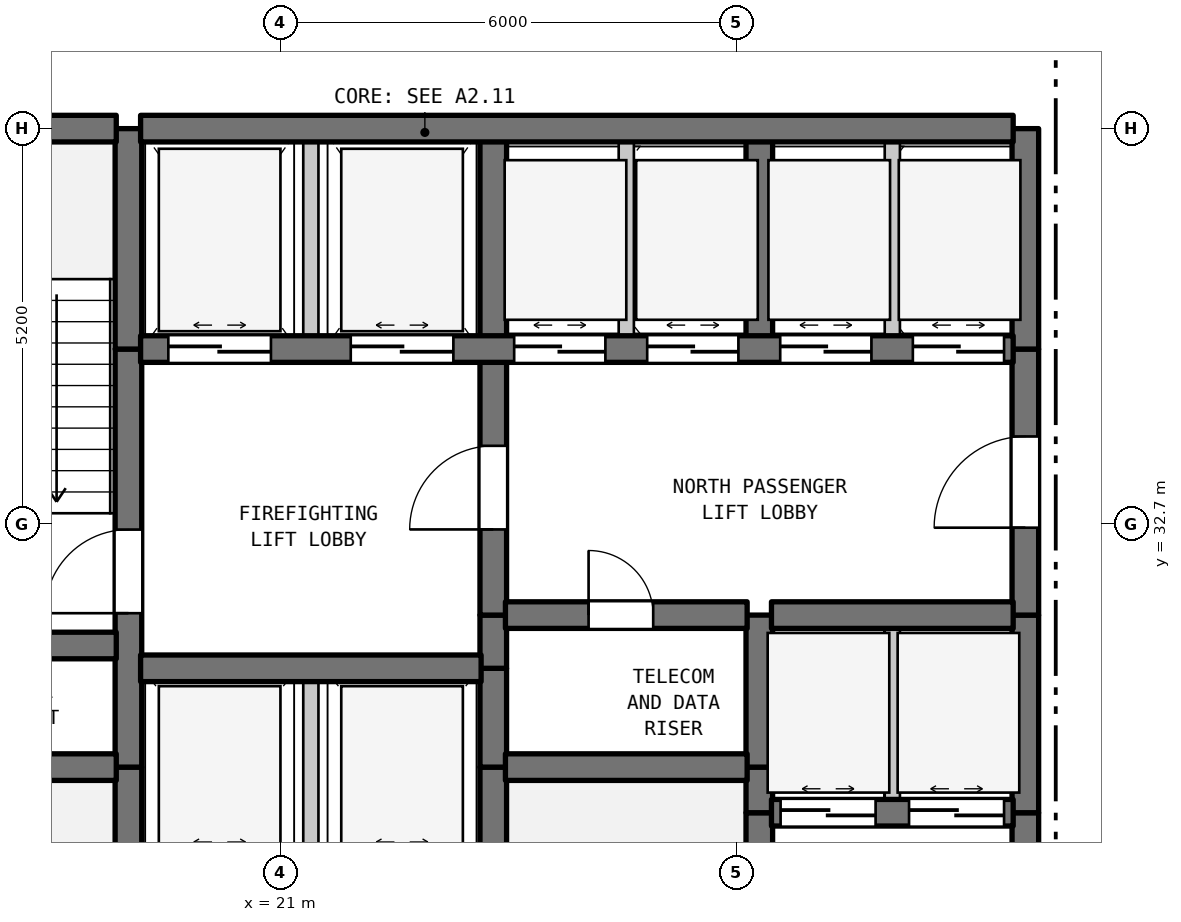
"""IFC4 building model, lengths in metres.
Left out: names, types, materials, properties, quantities, classifications, styles, units other than length and angle.
Written with IfcOpenShell. Run it as: python <this file> out.ifc"""

import sys

from ifc_helpers import new_model, si_unit, direction, frame, frame_2d, origin, place, context, subcontext, project, spatial, rectangle, extrude, element, fill, save


model = new_model("IFC4")
c1 = context("Model", 3, precision=1e-05, world=origin(), true_north=direction((0.0, 1.0)))
c2 = subcontext(c1, "Body", "Model", "MODEL_VIEW")
j1 = project(units=[si_unit("LENGTHUNIT", "METRE"), si_unit("PLANEANGLEUNIT", "RADIAN")], contexts=[c1])
p1 = place(None, origin())
s1 = spatial("IfcSite", under=j1, at=p1, CompositionType="ELEMENT")
p2 = place(p1, origin())
s2 = spatial("IfcBuilding", under=s1, at=p2, CompositionType="ELEMENT")
p3 = place(p2, frame((0.0, 0.0, 86.4)))
s3 = spatial("IfcBuildingStorey", under=s2, at=p3, CompositionType="ELEMENT", Elevation=86.4)
p4 = place(p3, frame((19.0, 28.2, 0.0), z_axis=(0.0, 0.0, 1.0), x_axis=(0.0, 1.0, 0.0)))
e1 = element("IfcWall", 1, at=p4, inside=s3, PredefinedType="SHEAR", context=c2, shape_type="SweptSolid", body=[
    extrude(rectangle(XDim=1.3, YDim=0.35, at=frame_2d((0.65, 0.0))), origin(), (0.0, 0.0, 1.0), 4.185),
])
p5 = place(p3, frame((19.0, 29.5, 0.0), z_axis=(0.0, 0.0, 1.0), x_axis=(0.0, 1.0, 0.0)))
e2 = element("IfcWall", 2, at=p5, inside=s3, PredefinedType="SHEAR", context=c2, shape_type="SweptSolid", body=[
    extrude(rectangle(XDim=5.5, YDim=0.35, at=frame_2d((2.75, 0.0))), origin(), (0.0, 0.0, 1.0), 4.185),
])
p6 = place(p5, frame((2.025, 0.0, 0.0)))
e3 = element("IfcOpeningElement", 3, at=p6, cuts=e2, PredefinedType="OPENING", context=c2, shape_type="SweptSolid", body=[
    extrude(rectangle(XDim=1.1, YDim=2.15, at=frame_2d((0.55, 1.075))), frame((0.0, 0.185, 0.0), z_axis=(0.0, -1.0, 0.0), x_axis=(1.0, 0.0, 0.0)), (0.0, 0.0, 1.0), 0.37),
])
p7 = place(p3, frame((19.0, 35.0, 0.0), z_axis=(0.0, 0.0, 1.0), x_axis=(0.0, 1.0, 0.0)))
e4 = element("IfcWall", 4, at=p7, inside=s3, PredefinedType="SHEAR", context=c2, shape_type="SweptSolid", body=[
    extrude(rectangle(XDim=2.9, YDim=0.35, at=frame_2d((1.45, 0.0))), origin(), (0.0, 0.0, 1.0), 4.185),
])
p8 = place(p3, frame((21.4, 28.2, 0.0), z_axis=(0.0, 0.0, 1.0), x_axis=(0.0, 1.0, 0.0)))
e5 = element("IfcWall", 5, at=p8, inside=s3, PredefinedType="STANDARD", context=c2, shape_type="SweptSolid", body=[
    extrude(rectangle(XDim=2.6, YDim=0.2, at=frame_2d((1.3, 0.0))), origin(), (0.0, 0.0, 1.0), 4.185),
])
p9 = place(p3, frame((21.4, 35.0, 0.0), z_axis=(0.0, 0.0, 1.0), x_axis=(0.0, 1.0, 0.0)))
e6 = element("IfcWall", 6, at=p9, inside=s3, PredefinedType="STANDARD", context=c2, shape_type="SweptSolid", body=[
    extrude(rectangle(XDim=2.9, YDim=0.2, at=frame_2d((1.45, 0.0))), origin(), (0.0, 0.0, 1.0), 4.185),
])
for number, where, z_axis, x_axis in (
    (7, (23.8, 28.2, 0.0), (0.0, 0.0, 1.0), (0.0, 1.0, 0.0)),
    (8, (23.8, 29.5, 0.0), (0.0, 0.0, 1.0), (0.0, 1.0, 0.0)),
):
    element("IfcWall", number, at=place(p3, frame(where, z_axis=z_axis, x_axis=x_axis)), inside=s3, PredefinedType="SHEAR", context=c2, shape_type="SweptSolid", body=[
        extrude(rectangle(XDim=1.3, YDim=0.35, at=frame_2d((0.65, 0.0))), origin(), (0.0, 0.0, 1.0), 4.185),
    ])
p10 = place(p3, frame((23.8, 30.8, 0.0), z_axis=(0.0, 0.0, 1.0), x_axis=(0.0, 1.0, 0.0)))
e9 = element("IfcWall", 9, at=p10, inside=s3, PredefinedType="SHEAR", context=c2, shape_type="SweptSolid", body=[
    extrude(rectangle(XDim=0.7, YDim=0.35, at=frame_2d((0.35, 0.0))), origin(), (0.0, 0.0, 1.0), 4.185),
])
p11 = place(p3, frame((23.8, 31.5, 0.0), z_axis=(0.0, 0.0, 1.0), x_axis=(0.0, 1.0, 0.0)))
e10 = element("IfcWall", 10, at=p11, inside=s3, PredefinedType="SHEAR", context=c2, shape_type="SweptSolid", body=[
    extrude(rectangle(XDim=3.5, YDim=0.35, at=frame_2d((1.75, 0.0))), origin(), (0.0, 0.0, 1.0), 4.185),
])
p12 = place(p11, frame((1.127, 0.0, 0.0)))
e11 = element("IfcOpeningElement", 11, at=p12, cuts=e10, PredefinedType="OPENING", context=c2, shape_type="SweptSolid", body=[
    extrude(rectangle(XDim=1.1, YDim=2.15, at=frame_2d((0.55, 1.075))), frame((0.0, 0.185, 0.0), z_axis=(0.0, -1.0, 0.0), x_axis=(1.0, 0.0, 0.0)), (0.0, 0.0, 1.0), 0.37),
])
p13 = place(p3, frame((23.8, 35.0, 0.0), z_axis=(0.0, 0.0, 1.0), x_axis=(0.0, 1.0, 0.0)))
e12 = element("IfcWall", 12, at=p13, inside=s3, PredefinedType="SHEAR", context=c2, shape_type="SweptSolid", body=[
    extrude(rectangle(XDim=2.9, YDim=0.35, at=frame_2d((1.45, 0.0))), origin(), (0.0, 0.0, 1.0), 4.185),
])
p14 = place(p3, frame((25.55, 35.0, 0.0), z_axis=(0.0, 0.0, 1.0), x_axis=(0.0, 1.0, 0.0)))
e13 = element("IfcWall", 13, at=p14, inside=s3, PredefinedType="STANDARD", context=c2, shape_type="SweptSolid", body=[
    extrude(rectangle(XDim=2.9, YDim=0.2, at=frame_2d((1.45, 0.0))), origin(), (0.0, 0.0, 1.0), 4.185),
])
p15 = place(p3, frame((27.3, 25.6, 0.0), z_axis=(0.0, 0.0, 1.0), x_axis=(0.0, 1.0, 0.0)))
e14 = element("IfcWall", 14, at=p15, inside=s3, PredefinedType="SHEAR", context=c2, shape_type="SweptSolid", body=[
    extrude(rectangle(XDim=3.3, YDim=0.35, at=frame_2d((1.65, 0.0))), origin(), (0.0, 0.0, 1.0), 4.185),
])
p16 = place(p3, frame((27.3, 28.9, 0.0), z_axis=(0.0, 0.0, 1.0), x_axis=(0.0, 1.0, 0.0)))
e15 = element("IfcWall", 15, at=p16, inside=s3, PredefinedType="SHEAR", context=c2, shape_type="SweptSolid", body=[
    extrude(rectangle(XDim=0.6, YDim=0.35, at=frame_2d((0.3, 0.0))), origin(), (0.0, 0.0, 1.0), 4.185),
])
p17 = place(p3, frame((27.3, 29.5, 0.0), z_axis=(0.0, 0.0, 1.0), x_axis=(0.0, 1.0, 0.0)))
e16 = element("IfcWall", 16, at=p17, inside=s3, PredefinedType="SHEAR", context=c2, shape_type="SweptSolid", body=[
    extrude(rectangle(XDim=2.0, YDim=0.35, at=frame_2d((1.0, 0.0))), origin(), (0.0, 0.0, 1.0), 4.185),
])
p18 = place(p3, frame((27.3, 35.0, 0.0), z_axis=(0.0, 0.0, 1.0), x_axis=(0.0, 1.0, 0.0)))
e17 = element("IfcWall", 17, at=p18, inside=s3, PredefinedType="SHEAR", context=c2, shape_type="SweptSolid", body=[
    extrude(rectangle(XDim=2.9, YDim=0.35, at=frame_2d((1.45, 0.0))), origin(), (0.0, 0.0, 1.0), 4.185),
])
p19 = place(p3, frame((29.05, 28.9, 0.0), z_axis=(0.0, 0.0, 1.0), x_axis=(0.0, 1.0, 0.0)))
e18 = element("IfcWall", 18, at=p19, inside=s3, PredefinedType="STANDARD", context=c2, shape_type="SweptSolid", body=[
    extrude(rectangle(XDim=2.6, YDim=0.2, at=frame_2d((1.3, 0.0))), origin(), (0.0, 0.0, 1.0), 4.185),
])
p20 = place(p3, frame((29.05, 35.0, 0.0), z_axis=(0.0, 0.0, 1.0), x_axis=(0.0, 1.0, 0.0)))
e19 = element("IfcWall", 19, at=p20, inside=s3, PredefinedType="STANDARD", context=c2, shape_type="SweptSolid", body=[
    extrude(rectangle(XDim=2.9, YDim=0.2, at=frame_2d((1.45, 0.0))), origin(), (0.0, 0.0, 1.0), 4.185),
])
p21 = place(p3, frame((30.8, 25.6, 0.0), z_axis=(0.0, 0.0, 1.0), x_axis=(0.0, 1.0, 0.0)))
e20 = element("IfcWall", 20, at=p21, inside=s3, PredefinedType="SHEAR", context=c2, shape_type="SweptSolid", body=[
    extrude(rectangle(XDim=3.3, YDim=0.35, at=frame_2d((1.65, 0.0))), origin(), (0.0, 0.0, 1.0), 4.185),
])
p22 = place(p21, frame((0.978, 0.0, 0.0)))
e21 = element("IfcOpeningElement", 21, at=p22, cuts=e20, PredefinedType="OPENING", context=c2, shape_type="SweptSolid", body=[
    extrude(rectangle(XDim=1.2, YDim=2.2, at=frame_2d((0.6, 1.1))), frame((0.0, 0.185, 0.0), z_axis=(0.0, -1.0, 0.0), x_axis=(1.0, 0.0, 0.0)), (0.0, 0.0, 1.0), 0.37),
])
p23 = place(p3, frame((30.8, 28.9, 0.0), z_axis=(0.0, 0.0, 1.0), x_axis=(0.0, 1.0, 0.0)))
e22 = element("IfcWall", 22, at=p23, inside=s3, PredefinedType="SHEAR", context=c2, shape_type="SweptSolid", body=[
    extrude(rectangle(XDim=2.6, YDim=0.35, at=frame_2d((1.3, 0.0))), origin(), (0.0, 0.0, 1.0), 4.185),
])
p24 = place(p3, frame((30.8, 31.5, 0.0), z_axis=(0.0, 0.0, 1.0), x_axis=(0.0, 1.0, 0.0)))
e23 = element("IfcWall", 23, at=p24, inside=s3, PredefinedType="SHEAR", context=c2, shape_type="SweptSolid", body=[
    extrude(rectangle(XDim=3.5, YDim=0.35, at=frame_2d((1.75, 0.0))), origin(), (0.0, 0.0, 1.0), 4.185),
])
p25 = place(p24, frame((1.15, 0.0, 0.0)))
e24 = element("IfcOpeningElement", 24, at=p25, cuts=e23, PredefinedType="OPENING", context=c2, shape_type="SweptSolid", body=[
    extrude(rectangle(XDim=1.2, YDim=2.2, at=frame_2d((0.6, 1.1))), frame((0.0, 0.185, 0.0), z_axis=(0.0, -1.0, 0.0), x_axis=(1.0, 0.0, 0.0)), (0.0, 0.0, 1.0), 0.37),
])
p26 = place(p3, frame((30.8, 35.0, 0.0), z_axis=(0.0, 0.0, 1.0), x_axis=(0.0, 1.0, 0.0)))
e25 = element("IfcWall", 25, at=p26, inside=s3, PredefinedType="SHEAR", context=c2, shape_type="SweptSolid", body=[
    extrude(rectangle(XDim=2.9, YDim=0.35, at=frame_2d((1.45, 0.0))), origin(), (0.0, 0.0, 1.0), 4.185),
])
p27 = place(p3, frame((27.46, 28.9, 0.0), z_axis=(0.0, 0.0, 1.0), x_axis=(1.0, 0.0, 0.0)))
e26 = element("IfcWall", 26, at=p27, inside=s3, PredefinedType="SHEAR", context=c2, shape_type="SweptSolid", body=[
    extrude(rectangle(XDim=3.18, YDim=0.35, at=frame_2d((1.59, 0.0))), origin(), (0.0, 0.0, 1.0), 4.185),
])
p28 = place(p27, frame((0.12, 0.0, 0.0)))
e27 = element("IfcOpeningElement", 27, at=p28, cuts=e26, PredefinedType="OPENING", context=c2, shape_type="SweptSolid", body=[
    extrude(rectangle(XDim=1.25, YDim=2.2, at=frame_2d((0.625, 1.1))), frame((0.0, 0.185, 0.0), z_axis=(0.0, -1.0, 0.0), x_axis=(1.0, 0.0, 0.0)), (0.0, 0.0, 1.0), 0.37),
])
p29 = place(p27, frame((1.81, 0.0, 0.0)))
e28 = element("IfcOpeningElement", 28, at=p29, cuts=e26, PredefinedType="OPENING", context=c2, shape_type="SweptSolid", body=[
    extrude(rectangle(XDim=1.25, YDim=2.2, at=frame_2d((0.625, 1.1))), frame((0.0, 0.185, 0.0), z_axis=(0.0, -1.0, 0.0), x_axis=(1.0, 0.0, 0.0)), (0.0, 0.0, 1.0), 0.37),
])
p30 = place(p3, frame((15.16, 29.5, 0.0), z_axis=(0.0, 0.0, 1.0), x_axis=(1.0, 0.0, 0.0)))
e29 = element("IfcWall", 29, at=p30, inside=s3, PredefinedType="SHEAR", context=c2, shape_type="SweptSolid", body=[
    extrude(rectangle(XDim=3.68, YDim=0.35, at=frame_2d((1.84, 0.0))), origin(), (0.0, 0.0, 1.0), 4.185),
])
p31 = place(p3, frame((23.96, 29.5, 0.0), z_axis=(0.0, 0.0, 1.0), x_axis=(1.0, 0.0, 0.0)))
e30 = element("IfcWall", 30, at=p31, inside=s3, PredefinedType="SHEAR", context=c2, shape_type="SweptSolid", body=[
    extrude(rectangle(XDim=3.18, YDim=0.35, at=frame_2d((1.59, 0.0))), origin(), (0.0, 0.0, 1.0), 4.185),
])
p32 = place(p3, frame((19.16, 30.8, 0.0), z_axis=(0.0, 0.0, 1.0), x_axis=(1.0, 0.0, 0.0)))
e31 = element("IfcWall", 31, at=p32, inside=s3, PredefinedType="SHEAR", context=c2, shape_type="SweptSolid", body=[
    extrude(rectangle(XDim=4.48, YDim=0.35, at=frame_2d((2.24, 0.0))), origin(), (0.0, 0.0, 1.0), 4.185),
])
p33 = place(p3, frame((15.16, 31.1, 0.0), z_axis=(0.0, 0.0, 1.0), x_axis=(1.0, 0.0, 0.0)))
e32 = element("IfcWall", 32, at=p33, inside=s3, PredefinedType="SHEAR", context=c2, shape_type="SweptSolid", body=[
    extrude(rectangle(XDim=3.68, YDim=0.35, at=frame_2d((1.84, 0.0))), origin(), (0.0, 0.0, 1.0), 4.185),
])
p34 = place(p3, frame((23.96, 31.5, 0.0), z_axis=(0.0, 0.0, 1.0), x_axis=(1.0, 0.0, 0.0)))
e33 = element("IfcWall", 33, at=p34, inside=s3, PredefinedType="SHEAR", context=c2, shape_type="SweptSolid", body=[
    extrude(rectangle(XDim=3.18, YDim=0.35, at=frame_2d((1.59, 0.0))), origin(), (0.0, 0.0, 1.0), 4.185),
])
p35 = place(p34, frame((1.094, 0.0, 0.0)))
e34 = element("IfcOpeningElement", 34, at=p35, cuts=e33, PredefinedType="OPENING", context=c2, shape_type="SweptSolid", body=[
    extrude(rectangle(XDim=0.85, YDim=2.1, at=frame_2d((0.425, 1.05))), frame((0.0, 0.185, 0.0), z_axis=(0.0, -1.0, 0.0), x_axis=(1.0, 0.0, 0.0)), (0.0, 0.0, 1.0), 0.37),
])
p36 = place(p3, frame((27.46, 31.5, 0.0), z_axis=(0.0, 0.0, 1.0), x_axis=(1.0, 0.0, 0.0)))
e35 = element("IfcWall", 35, at=p36, inside=s3, PredefinedType="SHEAR", context=c2, shape_type="SweptSolid", body=[
    extrude(rectangle(XDim=3.18, YDim=0.35, at=frame_2d((1.59, 0.0))), origin(), (0.0, 0.0, 1.0), 4.185),
])
p37 = place(p3, frame((19.16, 35.0, 0.0), z_axis=(0.0, 0.0, 1.0), x_axis=(1.0, 0.0, 0.0)))
e36 = element("IfcWall", 36, at=p37, inside=s3, PredefinedType="SHEAR", context=c2, shape_type="SweptSolid", body=[
    extrude(rectangle(XDim=11.48, YDim=0.35, at=frame_2d((5.74, 0.0))), origin(), (0.0, 0.0, 1.0), 4.185),
])
p38 = place(p37, frame((0.365, 0.0, 0.0)))
e37 = element("IfcOpeningElement", 37, at=p38, cuts=e36, PredefinedType="OPENING", context=c2, shape_type="SweptSolid", body=[
    extrude(rectangle(XDim=1.35, YDim=2.2, at=frame_2d((0.675, 1.1))), frame((0.0, 0.185, 0.0), z_axis=(0.0, -1.0, 0.0), x_axis=(1.0, 0.0, 0.0)), (0.0, 0.0, 1.0), 0.37),
])
p39 = place(p37, frame((2.765, 0.0, 0.0)))
e38 = element("IfcOpeningElement", 38, at=p39, cuts=e36, PredefinedType="OPENING", context=c2, shape_type="SweptSolid", body=[
    extrude(rectangle(XDim=1.35, YDim=2.2, at=frame_2d((0.675, 1.1))), frame((0.0, 0.185, 0.0), z_axis=(0.0, -1.0, 0.0), x_axis=(1.0, 0.0, 0.0)), (0.0, 0.0, 1.0), 0.37),
])
p40 = place(p37, frame((4.915, 0.0, 0.0)))
e39 = element("IfcOpeningElement", 39, at=p40, cuts=e36, PredefinedType="OPENING", context=c2, shape_type="SweptSolid", body=[
    extrude(rectangle(XDim=1.2, YDim=2.2, at=frame_2d((0.6, 1.1))), frame((0.0, 0.185, 0.0), z_axis=(0.0, -1.0, 0.0), x_axis=(1.0, 0.0, 0.0)), (0.0, 0.0, 1.0), 0.37),
])
p41 = place(p37, frame((6.665, 0.0, 0.0)))
e40 = element("IfcOpeningElement", 40, at=p41, cuts=e36, PredefinedType="OPENING", context=c2, shape_type="SweptSolid", body=[
    extrude(rectangle(XDim=1.2, YDim=2.2, at=frame_2d((0.6, 1.1))), frame((0.0, 0.185, 0.0), z_axis=(0.0, -1.0, 0.0), x_axis=(1.0, 0.0, 0.0)), (0.0, 0.0, 1.0), 0.37),
])
p42 = place(p37, frame((8.415, 0.0, 0.0)))
e41 = element("IfcOpeningElement", 41, at=p42, cuts=e36, PredefinedType="OPENING", context=c2, shape_type="SweptSolid", body=[
    extrude(rectangle(XDim=1.2, YDim=2.2, at=frame_2d((0.6, 1.1))), frame((0.0, 0.185, 0.0), z_axis=(0.0, -1.0, 0.0), x_axis=(1.0, 0.0, 0.0)), (0.0, 0.0, 1.0), 0.37),
])
p43 = place(p37, frame((10.16, 0.0, 0.0)))
e42 = element("IfcOpeningElement", 42, at=p43, cuts=e36, PredefinedType="OPENING", context=c2, shape_type="SweptSolid", body=[
    extrude(rectangle(XDim=1.2, YDim=2.2, at=frame_2d((0.6, 1.1))), frame((0.0, 0.185, 0.0), z_axis=(0.0, -1.0, 0.0), x_axis=(1.0, 0.0, 0.0)), (0.0, 0.0, 1.0), 0.37),
])
p44 = place(p3, frame((15.16, 37.9, 0.0), z_axis=(0.0, 0.0, 1.0), x_axis=(1.0, 0.0, 0.0)))
e43 = element("IfcWall", 43, at=p44, inside=s3, PredefinedType="SHEAR", context=c2, shape_type="SweptSolid", body=[
    extrude(rectangle(XDim=3.68, YDim=0.35, at=frame_2d((1.84, 0.0))), origin(), (0.0, 0.0, 1.0), 4.185),
])
p45 = place(p3, frame((19.16, 37.9, 0.0), z_axis=(0.0, 0.0, 1.0), x_axis=(1.0, 0.0, 0.0)))
e44 = element("IfcWall", 44, at=p45, inside=s3, PredefinedType="SHEAR", context=c2, shape_type="SweptSolid", body=[
    extrude(rectangle(XDim=11.48, YDim=0.35, at=frame_2d((5.74, 0.0))), origin(), (0.0, 0.0, 1.0), 4.185),
])
p46 = place(p6, origin())
e45 = element("IfcDoor", 45, at=p46, inside=s3, OperationType="SINGLE_SWING_LEFT", PredefinedType="DOOR", context=c2, shape_type="SweptSolid", body=[
    extrude(rectangle(XDim=1.1, YDim=2.15, at=frame_2d((0.55, 1.075))), frame((0.0, 0.025, 0.0), z_axis=(0.0, -1.0, 0.0), x_axis=(1.0, 0.0, 0.0)), (0.0, 0.0, 1.0), 0.05),
])
fill(e3, e45)
p47 = place(p12, origin())
e46 = element("IfcDoor", 46, at=p47, inside=s3, OperationType="SINGLE_SWING_LEFT", PredefinedType="DOOR", context=c2, shape_type="SweptSolid", body=[
    extrude(rectangle(XDim=1.1, YDim=2.15, at=frame_2d((0.55, 1.075))), frame((0.0, 0.025, 0.0), z_axis=(0.0, -1.0, 0.0), x_axis=(1.0, 0.0, 0.0)), (0.0, 0.0, 1.0), 0.05),
])
fill(e11, e46)
p48 = place(p25, origin())
e47 = element("IfcDoor", 47, at=p48, inside=s3, OperationType="SINGLE_SWING_LEFT", PredefinedType="DOOR", context=c2, shape_type="SweptSolid", body=[
    extrude(rectangle(XDim=1.2, YDim=2.2, at=frame_2d((0.6, 1.1))), frame((0.0, 0.025, 0.0), z_axis=(0.0, -1.0, 0.0), x_axis=(1.0, 0.0, 0.0)), (0.0, 0.0, 1.0), 0.05),
])
fill(e24, e47)
p49 = place(p28, origin())
e48 = element("IfcDoor", 48, at=p49, inside=s3, OperationType="DOUBLE_DOOR_SLIDING", PredefinedType="DOOR", context=c2, shape_type="SweptSolid", body=[
    extrude(rectangle(XDim=1.25, YDim=2.2, at=frame_2d((0.625, 1.1))), frame((0.0, 0.025, 0.0), z_axis=(0.0, -1.0, 0.0), x_axis=(1.0, 0.0, 0.0)), (0.0, 0.0, 1.0), 0.05),
])
fill(e27, e48)
p50 = place(p29, origin())
e49 = element("IfcDoor", 49, at=p50, inside=s3, OperationType="DOUBLE_DOOR_SLIDING", PredefinedType="DOOR", context=c2, shape_type="SweptSolid", body=[
    extrude(rectangle(XDim=1.25, YDim=2.2, at=frame_2d((0.625, 1.1))), frame((0.0, 0.025, 0.0), z_axis=(0.0, -1.0, 0.0), x_axis=(1.0, 0.0, 0.0)), (0.0, 0.0, 1.0), 0.05),
])
fill(e28, e49)
p51 = place(p35, origin())
e50 = element("IfcDoor", 50, at=p51, inside=s3, OperationType="SINGLE_SWING_LEFT", PredefinedType="DOOR", context=c2, shape_type="SweptSolid", body=[
    extrude(rectangle(XDim=0.85, YDim=2.1, at=frame_2d((0.425, 1.05))), frame((0.0, 0.025, 0.0), z_axis=(0.0, -1.0, 0.0), x_axis=(1.0, 0.0, 0.0)), (0.0, 0.0, 1.0), 0.05),
])
fill(e34, e50)
p52 = place(p38, origin())
e51 = element("IfcDoor", 51, at=p52, inside=s3, OperationType="DOUBLE_DOOR_SLIDING", PredefinedType="DOOR", context=c2, shape_type="SweptSolid", body=[
    extrude(rectangle(XDim=1.35, YDim=2.2, at=frame_2d((0.675, 1.1))), frame((0.0, 0.025, 0.0), z_axis=(0.0, -1.0, 0.0), x_axis=(1.0, 0.0, 0.0)), (0.0, 0.0, 1.0), 0.05),
])
fill(e37, e51)
p53 = place(p39, origin())
e52 = element("IfcDoor", 52, at=p53, inside=s3, OperationType="DOUBLE_DOOR_SLIDING", PredefinedType="DOOR", context=c2, shape_type="SweptSolid", body=[
    extrude(rectangle(XDim=1.35, YDim=2.2, at=frame_2d((0.675, 1.1))), frame((0.0, 0.025, 0.0), z_axis=(0.0, -1.0, 0.0), x_axis=(1.0, 0.0, 0.0)), (0.0, 0.0, 1.0), 0.05),
])
fill(e38, e52)
p54 = place(p40, origin())
e53 = element("IfcDoor", 53, at=p54, inside=s3, OperationType="DOUBLE_DOOR_SLIDING", PredefinedType="DOOR", context=c2, shape_type="SweptSolid", body=[
    extrude(rectangle(XDim=1.2, YDim=2.2, at=frame_2d((0.6, 1.1))), frame((0.0, 0.025, 0.0), z_axis=(0.0, -1.0, 0.0), x_axis=(1.0, 0.0, 0.0)), (0.0, 0.0, 1.0), 0.05),
])
fill(e39, e53)
p55 = place(p41, origin())
e54 = element("IfcDoor", 54, at=p55, inside=s3, OperationType="DOUBLE_DOOR_SLIDING", PredefinedType="DOOR", context=c2, shape_type="SweptSolid", body=[
    extrude(rectangle(XDim=1.2, YDim=2.2, at=frame_2d((0.6, 1.1))), frame((0.0, 0.025, 0.0), z_axis=(0.0, -1.0, 0.0), x_axis=(1.0, 0.0, 0.0)), (0.0, 0.0, 1.0), 0.05),
])
fill(e40, e54)
p56 = place(p42, origin())
e55 = element("IfcDoor", 55, at=p56, inside=s3, OperationType="DOUBLE_DOOR_SLIDING", PredefinedType="DOOR", context=c2, shape_type="SweptSolid", body=[
    extrude(rectangle(XDim=1.2, YDim=2.2, at=frame_2d((0.6, 1.1))), frame((0.0, 0.025, 0.0), z_axis=(0.0, -1.0, 0.0), x_axis=(1.0, 0.0, 0.0)), (0.0, 0.0, 1.0), 0.05),
])
fill(e41, e55)
p57 = place(p43, origin())
e56 = element("IfcDoor", 56, at=p57, inside=s3, OperationType="DOUBLE_DOOR_SLIDING", PredefinedType="DOOR", context=c2, shape_type="SweptSolid", body=[
    extrude(rectangle(XDim=1.2, YDim=2.2, at=frame_2d((0.6, 1.1))), frame((0.0, 0.025, 0.0), z_axis=(0.0, -1.0, 0.0), x_axis=(1.0, 0.0, 0.0)), (0.0, 0.0, 1.0), 0.05),
])
fill(e42, e56)
save(model, sys.argv[1])
